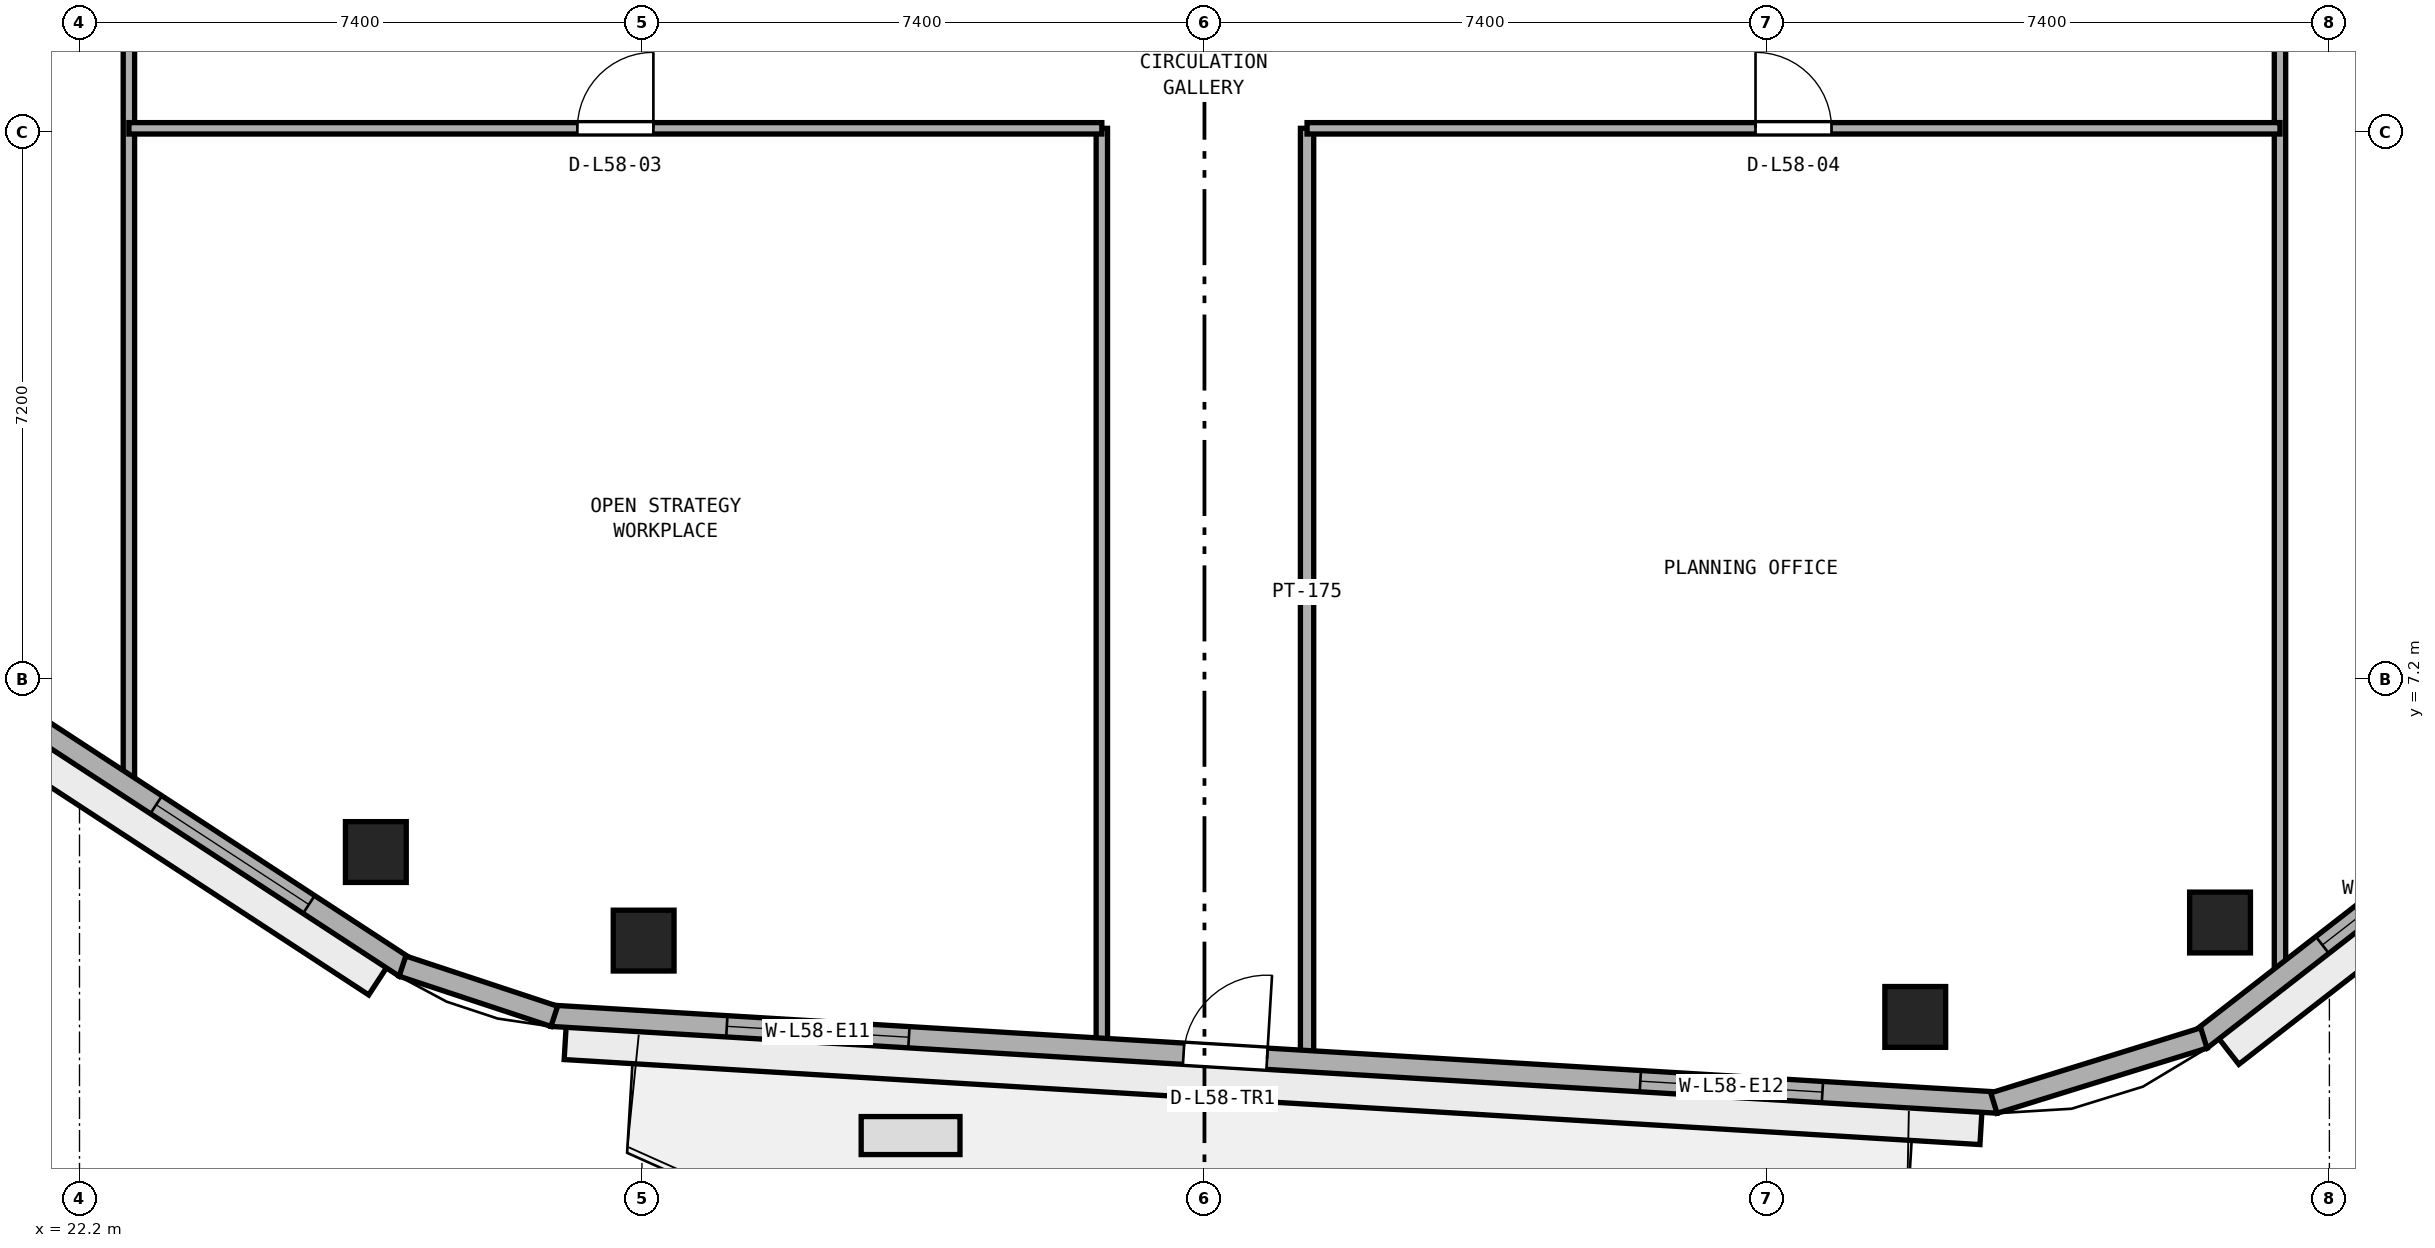
"""IFC4 building model, lengths in metres.
Left out: names, types, materials, properties, quantities, classifications, styles, units other than length and angle.
Written with IfcOpenShell. Run it as: python <this file> out.ifc"""

import sys

from ifc_helpers import new_model, si_unit, direction, frame, frame_2d, origin, origin_2d, place, context, subcontext, project, spatial, rectangle, extrude, element, fill, save


model = new_model("IFC4")
c1 = context("Model", 3, precision=1e-05, world=origin(), true_north=direction((0.0, 1.0)))
c2 = subcontext(c1, "Body", "Model", "MODEL_VIEW")
j1 = project(units=[si_unit("LENGTHUNIT", "METRE"), si_unit("PLANEANGLEUNIT", "RADIAN")], contexts=[c1])
p1 = place(None, origin())
s1 = spatial("IfcSite", under=j1, at=p1, CompositionType="ELEMENT")
p2 = place(p1, origin())
s2 = spatial("IfcBuilding", under=s1, at=p2, CompositionType="ELEMENT")
p3 = place(p2, frame((0.0, 0.0, 228.8)))
s3 = spatial("IfcBuildingStorey", under=s2, at=p3, CompositionType="ELEMENT", Elevation=228.8)
for number, where, z_axis, x_axis in (
    (1, (29.622, 3.764, 0.0), (0.0, 0.0, 1.0), (1.0, 0.0, 0.0)),
    (2, (46.352, 2.76, 0.0), (0.0, 0.0, 1.0), (1.0, 0.0, 0.0)),
    (3, (50.361, 4.002, 0.0), (0.0, 0.0, 1.0), (1.0, 0.0, 0.0)),
    (4, (26.099, 4.929, 0.0), (0.0, 0.0, 1.0), (1.0, 0.0, 0.0)),
):
    element("IfcColumn", number, at=place(p3, frame(where, z_axis=z_axis, x_axis=x_axis)), inside=s3, PredefinedType="COLUMN", context=c2, shape_type="SweptSolid", body=[
        extrude(rectangle(XDim=0.8, YDim=0.8, at=origin_2d()), origin(), (0.0, 0.0, 1.0), 3.8),
    ])
p4 = place(p3, frame((51.15, 3.235, 0.0), z_axis=(0.0, 0.0, 1.0), x_axis=(0.0, 1.0, 0.0)))
e5 = element("IfcWall", 5, at=p4, inside=s3, PredefinedType="PARTITIONING", context=c2, shape_type="SweptSolid", body=[
    extrude(rectangle(XDim=24.565, YDim=0.15, at=frame_2d((12.283, 0.0))), origin(), (0.0, 0.0, 1.0), 3.51),
])
p5 = place(p4, frame((17.27, 0.0, 0.0)))
e6 = element("IfcOpeningElement", 6, at=p5, cuts=e5, PredefinedType="OPENING", context=c2, shape_type="SweptSolid", body=[
    extrude(rectangle(XDim=1.0, YDim=2.12, at=frame_2d((0.5, 1.06))), frame((0.0, 0.085, 0.0), z_axis=(0.0, -1.0, 0.0), x_axis=(1.0, 0.0, 0.0)), (0.0, 0.0, 1.0), 0.17),
])
p6 = place(p3, frame((38.35, 2.243, 0.0), z_axis=(0.0, 0.0, 1.0), x_axis=(0.0, 1.0, 0.0)))
e7 = element("IfcWall", 7, at=p6, inside=s3, PredefinedType="PARTITIONING", context=c2, shape_type="SweptSolid", body=[
    extrude(rectangle(XDim=12.207, YDim=0.175, at=frame_2d((6.104, 0.0))), origin(), (0.0, 0.0, 1.0), 3.51),
])
p7 = place(p3, frame((35.65, 2.405, 0.0), z_axis=(0.0, 0.0, 1.0), x_axis=(0.0, 1.0, 0.0)))
e8 = element("IfcWall", 8, at=p7, inside=s3, PredefinedType="PARTITIONING", context=c2, shape_type="SweptSolid", body=[
    extrude(rectangle(XDim=12.045, YDim=0.15, at=frame_2d((6.022, 0.0))), origin(), (0.0, 0.0, 1.0), 3.51),
])
p8 = place(p3, frame((22.85, 5.758, 0.0), z_axis=(0.0, 0.0, 1.0), x_axis=(0.0, 1.0, 0.0)))
e9 = element("IfcWall", 9, at=p8, inside=s3, PredefinedType="PARTITIONING", context=c2, shape_type="SweptSolid", body=[
    extrude(rectangle(XDim=17.042, YDim=0.15, at=frame_2d((8.521, 0.0))), origin(), (0.0, 0.0, 1.0), 3.51),
])
p9 = place(p8, frame((11.367, 0.0, 0.0)))
e10 = element("IfcOpeningElement", 10, at=p9, cuts=e9, PredefinedType="OPENING", context=c2, shape_type="SweptSolid", body=[
    extrude(rectangle(XDim=0.9, YDim=2.1, at=frame_2d((0.45, 1.05))), frame((0.0, 0.085, 0.0), z_axis=(0.0, -1.0, 0.0), x_axis=(1.0, 0.0, 0.0)), (0.0, 0.0, 1.0), 0.17),
])
p10 = place(p8, frame((15.422, 0.0, 0.0)))
e11 = element("IfcOpeningElement", 11, at=p10, cuts=e9, PredefinedType="OPENING", context=c2, shape_type="SweptSolid", body=[
    extrude(rectangle(XDim=0.9, YDim=2.1, at=frame_2d((0.45, 1.05))), frame((0.0, 0.085, 0.0), z_axis=(0.0, -1.0, 0.0), x_axis=(1.0, 0.0, 0.0)), (0.0, 0.0, 1.0), 0.17),
])
p11 = place(p3, frame((22.85, 14.45, 0.0), z_axis=(0.0, 0.0, 1.0), x_axis=(1.0, 0.0, 0.0)))
e12 = element("IfcWall", 12, at=p11, inside=s3, PredefinedType="PARTITIONING", context=c2, shape_type="SweptSolid", body=[
    extrude(rectangle(XDim=12.8, YDim=0.15, at=frame_2d((6.4, 0.0))), origin(), (0.0, 0.0, 1.0), 3.51),
])
p12 = place(p11, frame((5.9, 0.0, 0.0)))
e13 = element("IfcOpeningElement", 13, at=p12, cuts=e12, PredefinedType="OPENING", context=c2, shape_type="SweptSolid", body=[
    extrude(rectangle(XDim=1.0, YDim=2.12, at=frame_2d((0.5, 1.06))), frame((0.0, 0.085, 0.0), z_axis=(0.0, -1.0, 0.0), x_axis=(1.0, 0.0, 0.0)), (0.0, 0.0, 1.0), 0.17),
])
p13 = place(p3, frame((38.35, 14.45, 0.0), z_axis=(0.0, 0.0, 1.0), x_axis=(1.0, 0.0, 0.0)))
e14 = element("IfcWall", 14, at=p13, inside=s3, PredefinedType="PARTITIONING", context=c2, shape_type="SweptSolid", body=[
    extrude(rectangle(XDim=12.8, YDim=0.15, at=frame_2d((6.4, 0.0))), origin(), (0.0, 0.0, 1.0), 3.51),
])
p14 = place(p13, frame((5.9, 0.0, 0.0)))
e15 = element("IfcOpeningElement", 15, at=p14, cuts=e14, PredefinedType="OPENING", context=c2, shape_type="SweptSolid", body=[
    extrude(rectangle(XDim=1.0, YDim=2.12, at=frame_2d((0.5, 1.06))), frame((0.0, 0.085, 0.0), z_axis=(0.0, -1.0, 0.0), x_axis=(1.0, 0.0, 0.0)), (0.0, 0.0, 1.0), 0.17),
])
p15 = place(p3, frame((28.411, 2.774, 0.0), z_axis=(0.0, 0.0, 1.0), x_axis=(0.998203068368, -0.059921901676, 0.0)))
e16 = element("IfcWall", 16, at=p15, inside=s3, PredefinedType="STANDARD", context=c2, shape_type="SweptSolid", body=[
    extrude(rectangle(XDim=19.06, YDim=0.28, at=frame_2d((9.53, 0.0))), origin(), (0.0, 0.0, 1.0), 3.51),
])
p16 = place(p15, frame((8.33, 0.0, 0.0)))
e17 = element("IfcOpeningElement", 17, at=p16, cuts=e16, PredefinedType="OPENING", context=c2, shape_type="SweptSolid", body=[
    extrude(rectangle(XDim=1.1, YDim=2.2, at=frame_2d((0.55, 1.1))), frame((0.0, 0.15, 0.0), z_axis=(0.0, -1.0, 0.0), x_axis=(1.0, 0.0, 0.0)), (0.0, 0.0, 1.0), 0.3),
])
p17 = place(p15, frame((2.31, 0.0, 0.9)))
e18 = element("IfcOpeningElement", 18, at=p17, cuts=e16, PredefinedType="OPENING", context=c2, shape_type="SweptSolid", body=[
    extrude(rectangle(XDim=2.4, YDim=1.75, at=frame_2d((1.2, 0.875))), frame((0.0, 0.15, 0.0), z_axis=(0.0, -1.0, 0.0), x_axis=(1.0, 0.0, 0.0)), (0.0, 0.0, 1.0), 0.3),
])
p18 = place(p15, frame((14.35, 0.0, 0.9)))
e19 = element("IfcOpeningElement", 19, at=p18, cuts=e16, PredefinedType="OPENING", context=c2, shape_type="SweptSolid", body=[
    extrude(rectangle(XDim=2.4, YDim=1.75, at=frame_2d((1.2, 0.875))), frame((0.0, 0.15, 0.0), z_axis=(0.0, -1.0, 0.0), x_axis=(1.0, 0.0, 0.0)), (0.0, 0.0, 1.0), 0.3),
])
p19 = place(p3, frame((50.104, 2.459, 0.0), z_axis=(0.0, 0.0, 1.0), x_axis=(0.789464857485, 0.613795763097, 0.0)))
e20 = element("IfcWall", 20, at=p19, inside=s3, PredefinedType="STANDARD", context=c2, shape_type="SweptSolid", body=[
    extrude(rectangle(XDim=17.387, YDim=0.28, at=frame_2d((8.694, 0.0))), origin(), (0.0, 0.0, 1.0), 3.51),
])
p20 = place(p19, frame((2.031, 0.0, 0.9)))
e21 = element("IfcOpeningElement", 21, at=p20, cuts=e20, PredefinedType="OPENING", context=c2, shape_type="SweptSolid", body=[
    extrude(rectangle(XDim=2.4, YDim=1.75, at=frame_2d((1.2, 0.875))), frame((0.0, 0.15, 0.0), z_axis=(0.0, -1.0, 0.0), x_axis=(1.0, 0.0, 0.0)), (0.0, 0.0, 1.0), 0.3),
])
p21 = place(p19, frame((7.494, 0.0, 0.9)))
e22 = element("IfcOpeningElement", 22, at=p21, cuts=e20, PredefinedType="OPENING", context=c2, shape_type="SweptSolid", body=[
    extrude(rectangle(XDim=2.4, YDim=1.75, at=frame_2d((1.2, 0.875))), frame((0.0, 0.15, 0.0), z_axis=(0.0, -1.0, 0.0), x_axis=(1.0, 0.0, 0.0)), (0.0, 0.0, 1.0), 0.3),
])
p22 = place(p19, frame((12.956, 0.0, 0.9)))
e23 = element("IfcOpeningElement", 23, at=p22, cuts=e20, PredefinedType="OPENING", context=c2, shape_type="SweptSolid", body=[
    extrude(rectangle(XDim=2.4, YDim=1.75, at=frame_2d((1.2, 0.875))), frame((0.0, 0.15, 0.0), z_axis=(0.0, -1.0, 0.0), x_axis=(1.0, 0.0, 0.0)), (0.0, 0.0, 1.0), 0.3),
])
p23 = place(p3, frame((12.034, 12.854, 0.0), z_axis=(0.0, 0.0, 1.0), x_axis=(0.837118352984, -0.547021812269, 0.0)))
e24 = element("IfcWall", 24, at=p23, inside=s3, PredefinedType="STANDARD", context=c2, shape_type="SweptSolid", body=[
    extrude(rectangle(XDim=17.259, YDim=0.28, at=frame_2d((8.63, 0.0))), origin(), (0.0, 0.0, 1.0), 3.51),
])
p24 = place(p23, frame((2.01, 0.0, 0.9)))
e25 = element("IfcOpeningElement", 25, at=p24, cuts=e24, PredefinedType="OPENING", context=c2, shape_type="SweptSolid", body=[
    extrude(rectangle(XDim=2.4, YDim=1.75, at=frame_2d((1.2, 0.875))), frame((0.0, 0.15, 0.0), z_axis=(0.0, -1.0, 0.0), x_axis=(1.0, 0.0, 0.0)), (0.0, 0.0, 1.0), 0.3),
])
p25 = place(p23, frame((7.43, 0.0, 0.9)))
e26 = element("IfcOpeningElement", 26, at=p25, cuts=e24, PredefinedType="OPENING", context=c2, shape_type="SweptSolid", body=[
    extrude(rectangle(XDim=2.4, YDim=1.75, at=frame_2d((1.2, 0.875))), frame((0.0, 0.15, 0.0), z_axis=(0.0, -1.0, 0.0), x_axis=(1.0, 0.0, 0.0)), (0.0, 0.0, 1.0), 0.3),
])
p26 = place(p23, frame((13.349, 0.0, 0.9)))
e27 = element("IfcOpeningElement", 27, at=p26, cuts=e24, PredefinedType="OPENING", context=c2, shape_type="SweptSolid", body=[
    extrude(rectangle(XDim=2.4, YDim=1.75, at=frame_2d((1.2, 0.875))), frame((0.0, 0.15, 0.0), z_axis=(0.0, -1.0, 0.0), x_axis=(1.0, 0.0, 0.0)), (0.0, 0.0, 1.0), 0.3),
])
p27 = place(p3, frame((47.386, 1.626, 0.0), z_axis=(0.0, 0.0, 1.0), x_axis=(0.955189316149, 0.29599555793, 0.0)))
e28 = element("IfcWall", 28, at=p27, inside=s3, PredefinedType="STANDARD", context=c2, shape_type="SweptSolid", body=[
    extrude(rectangle(XDim=2.892, YDim=0.28, at=frame_2d((1.446, 0.0))), origin(), (0.0, 0.0, 1.0), 3.51),
])
p28 = place(p3, frame((26.449, 3.428, 0.0), z_axis=(0.0, 0.0, 1.0), x_axis=(0.949435039229, -0.313963542923, 0.0)))
e29 = element("IfcWall", 29, at=p28, inside=s3, PredefinedType="STANDARD", context=c2, shape_type="SweptSolid", body=[
    extrude(rectangle(XDim=2.104, YDim=0.28, at=frame_2d((1.052, 0.0))), origin(), (0.0, 0.0, 1.0), 3.51),
])
p29 = place(p12, origin())
e30 = element("IfcDoor", 30, at=p29, inside=s3, OperationType="SINGLE_SWING_RIGHT", PredefinedType="DOOR", context=c2, shape_type="SweptSolid", body=[
    extrude(rectangle(XDim=1.0, YDim=2.12, at=frame_2d((0.5, 1.06))), frame((0.0, 0.025, 0.0), z_axis=(0.0, -1.0, 0.0), x_axis=(1.0, 0.0, 0.0)), (0.0, 0.0, 1.0), 0.05),
])
fill(e13, e30)
p30 = place(p14, origin())
e31 = element("IfcDoor", 31, at=p30, inside=s3, OperationType="SINGLE_SWING_LEFT", PredefinedType="DOOR", context=c2, shape_type="SweptSolid", body=[
    extrude(rectangle(XDim=1.0, YDim=2.12, at=frame_2d((0.5, 1.06))), frame((0.0, 0.025, 0.0), z_axis=(0.0, -1.0, 0.0), x_axis=(1.0, 0.0, 0.0)), (0.0, 0.0, 1.0), 0.05),
])
fill(e15, e31)
p31 = place(p16, origin())
e32 = element("IfcDoor", 32, at=p31, inside=s3, OperationType="SINGLE_SWING_RIGHT", PredefinedType="DOOR", context=c2, shape_type="SweptSolid", body=[
    extrude(rectangle(XDim=1.1, YDim=2.2, at=frame_2d((0.55, 1.1))), frame((0.0, 0.025, 0.0), z_axis=(0.0, -1.0, 0.0), x_axis=(1.0, 0.0, 0.0)), (0.0, 0.0, 1.0), 0.05),
])
fill(e17, e32)
p32 = place(p17, origin())
e33 = element("IfcWindow", 33, at=p32, inside=s3, PartitioningType="SINGLE_PANEL", PredefinedType="WINDOW", context=c2, shape_type="SweptSolid", body=[
    extrude(rectangle(XDim=2.4, YDim=1.75, at=frame_2d((1.2, 0.875))), frame((0.0, 0.03, 0.0), z_axis=(0.0, -1.0, 0.0), x_axis=(1.0, 0.0, 0.0)), (0.0, 0.0, 1.0), 0.06),
])
fill(e18, e33)
p33 = place(p18, origin())
e34 = element("IfcWindow", 34, at=p33, inside=s3, PartitioningType="SINGLE_PANEL", PredefinedType="WINDOW", context=c2, shape_type="SweptSolid", body=[
    extrude(rectangle(XDim=2.4, YDim=1.75, at=frame_2d((1.2, 0.875))), frame((0.0, 0.03, 0.0), z_axis=(0.0, -1.0, 0.0), x_axis=(1.0, 0.0, 0.0)), (0.0, 0.0, 1.0), 0.06),
])
fill(e19, e34)
p34 = place(p20, origin())
e35 = element("IfcWindow", 35, at=p34, inside=s3, PartitioningType="SINGLE_PANEL", PredefinedType="WINDOW", context=c2, shape_type="SweptSolid", body=[
    extrude(rectangle(XDim=2.4, YDim=1.75, at=frame_2d((1.2, 0.875))), frame((0.0, 0.03, 0.0), z_axis=(0.0, -1.0, 0.0), x_axis=(1.0, 0.0, 0.0)), (0.0, 0.0, 1.0), 0.06),
])
fill(e21, e35)
p35 = place(p26, origin())
e36 = element("IfcWindow", 36, at=p35, inside=s3, PartitioningType="SINGLE_PANEL", PredefinedType="WINDOW", context=c2, shape_type="SweptSolid", body=[
    extrude(rectangle(XDim=2.4, YDim=1.75, at=frame_2d((1.2, 0.875))), frame((0.0, 0.03, 0.0), z_axis=(0.0, -1.0, 0.0), x_axis=(1.0, 0.0, 0.0)), (0.0, 0.0, 1.0), 0.06),
])
fill(e27, e36)
save(model, sys.argv[1])
